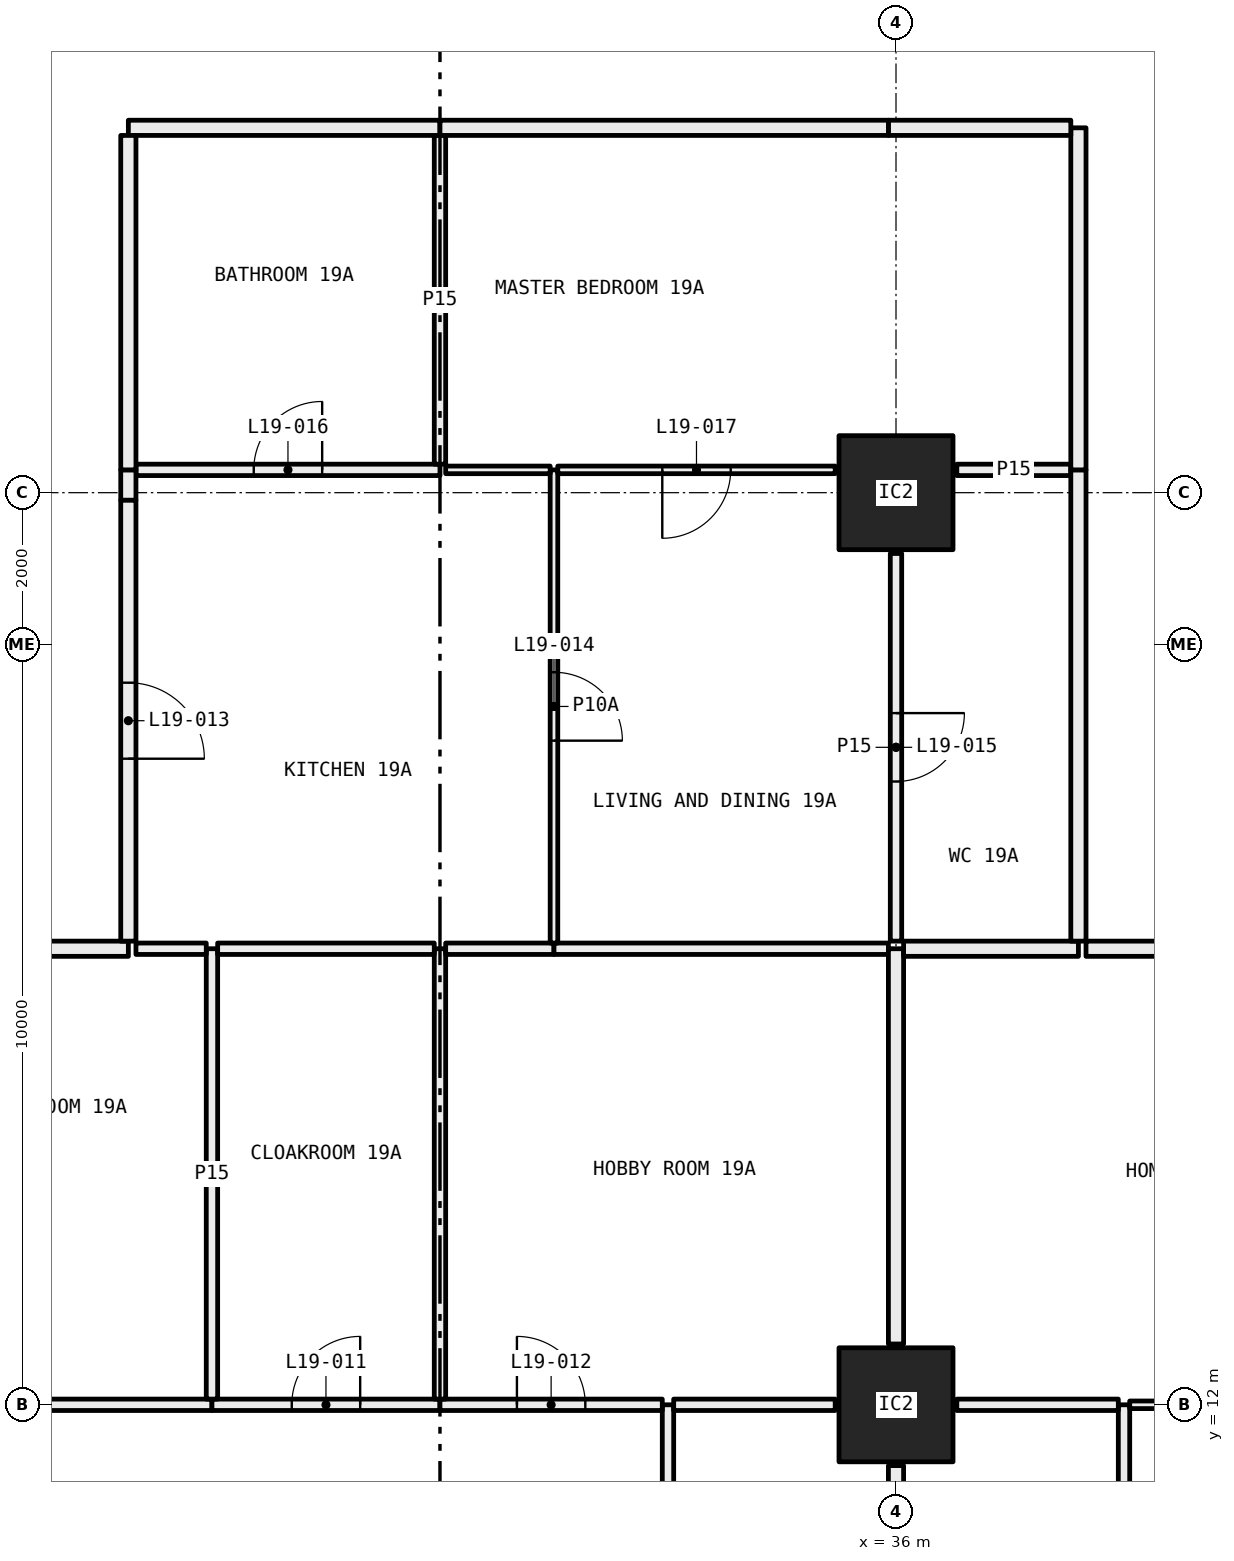
"""IFC4 building model, lengths in metres.
Left out: names, types, materials, properties, quantities, classifications, styles, units other than length and angle.
Written with IfcOpenShell. Run it as: python <this file> out.ifc"""

import sys

from ifc_helpers import new_model, si_unit, direction, frame, frame_2d, origin, origin_2d, place, context, subcontext, project, spatial, rectangle, hollow_rectangle, extrude, element, fill, save


model = new_model("IFC4")
c1 = context("Model", 3, precision=1e-05, world=origin(), true_north=direction((0.0, 1.0)))
c2 = subcontext(c1, "Body", "Model", "MODEL_VIEW")
j1 = project(units=[si_unit("LENGTHUNIT", "METRE"), si_unit("PLANEANGLEUNIT", "RADIAN")], contexts=[c1])
p1 = place(None, origin())
s1 = spatial("IfcSite", under=j1, at=p1, CompositionType="ELEMENT")
p2 = place(p1, origin())
s2 = spatial("IfcBuilding", under=s1, at=p2, CompositionType="ELEMENT")
p3 = place(p2, frame((0.0, 0.0, 78.3)))
s3 = spatial("IfcBuildingStorey", under=s2, at=p3, CompositionType="ELEMENT", Elevation=78.3)
for number, where, z_axis, x_axis in (
    (1, (36.0, 12.0, 0.0), (0.0, 0.0, 1.0), (1.0, 0.0, 0.0)),
    (2, (36.0, 24.0, 0.0), (0.0, 0.0, 1.0), (1.0, 0.0, 0.0)),
):
    element("IfcColumn", number, at=place(p3, frame(where, z_axis=z_axis, x_axis=x_axis)), inside=s3, PredefinedType="COLUMN", context=c2, shape_type="SweptSolid", body=[
        extrude(hollow_rectangle(XDim=1.5, YDim=1.5, WallThickness=0.065, at=origin_2d()), origin(), (0.0, 0.0, 1.0), 3.05),
    ])
p4 = place(p3, frame((33.0, 6.075, 0.0), z_axis=(0.0, 0.0, 1.0), x_axis=(0.0, 1.0, 0.0)))
e3 = element("IfcWall", 3, at=p4, inside=s3, PredefinedType="PARTITIONING", context=c2, shape_type="SweptSolid", body=[
    extrude(rectangle(XDim=5.925, YDim=0.15, at=frame_2d((2.962, 0.0))), origin(), (0.0, 0.0, 1.0), 2.45),
])
p5 = place(p4, frame((2.512, 0.0, 0.0)))
e4 = element("IfcOpeningElement", 4, at=p5, cuts=e3, PredefinedType="OPENING", context=c2, shape_type="SweptSolid", body=[
    extrude(rectangle(XDim=0.9, YDim=2.1, at=frame_2d((0.45, 1.05))), frame((0.0, 0.085, 0.0), z_axis=(0.0, -1.0, 0.0), x_axis=(1.0, 0.0, 0.0)), (0.0, 0.0, 1.0), 0.17),
])
p6 = place(p3, frame((27.0, 12.0, 0.0), z_axis=(0.0, 0.0, 1.0), x_axis=(-1.0, 0.0, 0.0)))
e5 = element("IfcWall", 5, at=p6, inside=s3, PredefinedType="PARTITIONING", context=c2, shape_type="SweptSolid", body=[
    extrude(rectangle(XDim=2.2, YDim=0.15, at=frame_2d((1.1, 0.0))), origin(), (0.0, 0.0, 1.0), 2.45),
])
p7 = place(p3, frame((30.0, 12.0, 0.0), z_axis=(0.0, 0.0, 1.0), x_axis=(-1.0, 0.0, 0.0)))
e6 = element("IfcWall", 6, at=p7, inside=s3, PredefinedType="PARTITIONING", context=c2, shape_type="SweptSolid", body=[
    extrude(rectangle(XDim=3.0, YDim=0.15, at=frame_2d((1.5, 0.0))), origin(), (0.0, 0.0, 1.0), 2.45),
])
p8 = place(p7, frame((1.05, 0.0, 0.0)))
e7 = element("IfcOpeningElement", 7, at=p8, cuts=e6, PredefinedType="OPENING", context=c2, shape_type="SweptSolid", body=[
    extrude(rectangle(XDim=0.9, YDim=2.1, at=frame_2d((0.45, 1.05))), frame((0.0, 0.085, 0.0), z_axis=(0.0, -1.0, 0.0), x_axis=(1.0, 0.0, 0.0)), (0.0, 0.0, 1.0), 0.17),
])
p9 = place(p3, frame((32.925, 12.0, 0.0), z_axis=(0.0, 0.0, 1.0), x_axis=(-1.0, 0.0, 0.0)))
e8 = element("IfcWall", 8, at=p9, inside=s3, PredefinedType="PARTITIONING", context=c2, shape_type="SweptSolid", body=[
    extrude(rectangle(XDim=2.925, YDim=0.15, at=frame_2d((1.462, 0.0))), origin(), (0.0, 0.0, 1.0), 2.45),
])
p10 = place(p9, frame((1.012, 0.0, 0.0)))
e9 = element("IfcOpeningElement", 9, at=p10, cuts=e8, PredefinedType="OPENING", context=c2, shape_type="SweptSolid", body=[
    extrude(rectangle(XDim=0.9, YDim=2.1, at=frame_2d((0.45, 1.05))), frame((0.0, 0.085, 0.0), z_axis=(0.0, -1.0, 0.0), x_axis=(1.0, 0.0, 0.0)), (0.0, 0.0, 1.0), 0.17),
])
p11 = place(p3, frame((35.2, 12.0, 0.0), z_axis=(0.0, 0.0, 1.0), x_axis=(-1.0, 0.0, 0.0)))
e10 = element("IfcWall", 10, at=p11, inside=s3, PredefinedType="PARTITIONING", context=c2, shape_type="SweptSolid", body=[
    extrude(rectangle(XDim=2.125, YDim=0.15, at=frame_2d((1.062, 0.0))), origin(), (0.0, 0.0, 1.0), 2.45),
])
p12 = place(p3, frame((36.0, 6.0, 0.0), z_axis=(0.0, 0.0, 1.0), x_axis=(0.0, 1.0, 0.0)))
e11 = element("IfcWall", 11, at=p12, inside=s3, PredefinedType="PARTITIONING", context=c2, shape_type="SweptSolid", body=[
    extrude(rectangle(XDim=5.2, YDim=0.2, at=frame_2d((2.6, 0.0))), origin(), (0.0, 0.0, 1.0), 2.45),
])
p13 = place(p3, frame((27.0, 12.075, 0.0), z_axis=(0.0, 0.0, 1.0), x_axis=(0.0, 1.0, 0.0)))
e12 = element("IfcWall", 12, at=p13, inside=s3, PredefinedType="PARTITIONING", context=c2, shape_type="SweptSolid", body=[
    extrude(rectangle(XDim=5.925, YDim=0.15, at=frame_2d((2.962, 0.0))), origin(), (0.0, 0.0, 1.0), 2.45),
])
p14 = place(p3, frame((26.925, 18.0, 0.0), z_axis=(0.0, 0.0, 1.0), x_axis=(-1.0, 0.0, 0.0)))
e13 = element("IfcWall", 13, at=p14, inside=s3, PredefinedType="PARTITIONING", context=c2, shape_type="SweptSolid", body=[
    extrude(rectangle(XDim=0.925, YDim=0.15, at=frame_2d((0.462, 0.0))), origin(), (0.0, 0.0, 1.0), 3.05),
])
p15 = place(p3, frame((25.9, 18.0, 0.0), z_axis=(0.0, 0.0, 1.0), x_axis=(-1.0, 0.0, 0.0)))
e14 = element("IfcWall", 14, at=p15, inside=s3, PredefinedType="PARTITIONING", context=c2, shape_type="SweptSolid", body=[
    extrude(rectangle(XDim=3.4, YDim=0.2, at=frame_2d((1.7, 0.0))), origin(), (0.0, 0.0, 1.0), 3.05),
])
p16 = place(p3, frame((30.0, 12.075, 0.0), z_axis=(0.0, 0.0, 1.0), x_axis=(0.0, 1.0, 0.0)))
e15 = element("IfcWall", 15, at=p16, inside=s3, PredefinedType="PARTITIONING", context=c2, shape_type="SweptSolid", body=[
    extrude(rectangle(XDim=5.925, YDim=0.15, at=frame_2d((2.962, 0.0))), origin(), (0.0, 0.0, 1.0), 2.45),
])
p17 = place(p3, frame((29.925, 18.0, 0.0), z_axis=(0.0, 0.0, 1.0), x_axis=(-1.0, 0.0, 0.0)))
e16 = element("IfcWall", 16, at=p17, inside=s3, PredefinedType="PARTITIONING", context=c2, shape_type="SweptSolid", body=[
    extrude(rectangle(XDim=2.85, YDim=0.15, at=frame_2d((1.425, 0.0))), origin(), (0.0, 0.0, 1.0), 3.05),
])
p18 = place(p3, frame((31.5, 18.0, 0.0), z_axis=(0.0, 0.0, 1.0), x_axis=(-1.0, 0.0, 0.0)))
e17 = element("IfcWall", 17, at=p18, inside=s3, PredefinedType="PARTITIONING", context=c2, shape_type="SweptSolid", body=[
    extrude(rectangle(XDim=1.425, YDim=0.15, at=frame_2d((0.712, 0.0))), origin(), (0.0, 0.0, 1.0), 3.05),
])
p19 = place(p3, frame((35.9, 18.0, 0.0), z_axis=(0.0, 0.0, 1.0), x_axis=(-1.0, 0.0, 0.0)))
e18 = element("IfcWall", 18, at=p19, inside=s3, PredefinedType="PARTITIONING", context=c2, shape_type="SweptSolid", body=[
    extrude(rectangle(XDim=4.4, YDim=0.15, at=frame_2d((2.2, 0.0))), origin(), (0.0, 0.0, 1.0), 3.05),
])
p20 = place(p3, frame((36.0, 12.8, 0.0), z_axis=(0.0, 0.0, 1.0), x_axis=(0.0, 1.0, 0.0)))
e19 = element("IfcWall", 19, at=p20, inside=s3, PredefinedType="PARTITIONING", context=c2, shape_type="SweptSolid", body=[
    extrude(rectangle(XDim=5.2, YDim=0.2, at=frame_2d((2.6, 0.0))), origin(), (0.0, 0.0, 1.0), 2.45),
])
p21 = place(p3, frame((31.5, 18.075, 0.0), z_axis=(0.0, 0.0, 1.0), x_axis=(0.0, 1.0, 0.0)))
e20 = element("IfcWall", 20, at=p21, inside=s3, PredefinedType="PARTITIONING", context=c2, shape_type="SweptSolid", body=[
    extrude(rectangle(XDim=6.225, YDim=0.1, at=frame_2d((3.113, 0.0))), origin(), (0.0, 0.0, 1.0), 2.45),
])
p22 = place(p21, frame((2.663, 0.0, 0.0)))
e21 = element("IfcOpeningElement", 21, at=p22, cuts=e20, PredefinedType="OPENING", context=c2, shape_type="SweptSolid", body=[
    extrude(rectangle(XDim=0.9, YDim=2.1, at=frame_2d((0.45, 1.05))), frame((0.0, 0.06, 0.0), z_axis=(0.0, -1.0, 0.0), x_axis=(1.0, 0.0, 0.0)), (0.0, 0.0, 1.0), 0.12),
])
p23 = place(p3, frame((30.0, 24.3, 0.0), z_axis=(0.0, 0.0, 1.0), x_axis=(-1.0, 0.0, 0.0)))
e22 = element("IfcWall", 22, at=p23, inside=s3, PredefinedType="PARTITIONING", context=c2, shape_type="SweptSolid", body=[
    extrude(rectangle(XDim=4.0, YDim=0.15, at=frame_2d((2.0, 0.0))), origin(), (0.0, 0.0, 1.0), 3.05),
])
p24 = place(p23, frame((1.55, 0.0, 0.0)))
e23 = element("IfcOpeningElement", 23, at=p24, cuts=e22, PredefinedType="OPENING", context=c2, shape_type="SweptSolid", body=[
    extrude(rectangle(XDim=0.9, YDim=2.1, at=frame_2d((0.45, 1.05))), frame((0.0, 0.085, 0.0), z_axis=(0.0, -1.0, 0.0), x_axis=(1.0, 0.0, 0.0)), (0.0, 0.0, 1.0), 0.17),
])
p25 = place(p3, frame((31.45, 24.3, 0.0), z_axis=(0.0, 0.0, 1.0), x_axis=(-1.0, 0.0, 0.0)))
e24 = element("IfcWall", 24, at=p25, inside=s3, PredefinedType="PARTITIONING", context=c2, shape_type="SweptSolid", body=[
    extrude(rectangle(XDim=1.375, YDim=0.1, at=frame_2d((0.688, 0.0))), origin(), (0.0, 0.0, 1.0), 3.05),
])
p26 = place(p3, frame((25.9, 24.3, 0.0), z_axis=(0.0, 0.0, 1.0), x_axis=(0.0, -1.0, 0.0)))
e25 = element("IfcWall", 25, at=p26, inside=s3, PredefinedType="PARTITIONING", context=c2, shape_type="SweptSolid", body=[
    extrude(rectangle(XDim=0.4, YDim=0.2, at=frame_2d((0.2, 0.0))), origin(), (0.0, 0.0, 1.0), 2.45),
])
p27 = place(p3, frame((25.9, 23.9, 0.0), z_axis=(0.0, 0.0, 1.0), x_axis=(0.0, -1.0, 0.0)))
e26 = element("IfcWall", 26, at=p27, inside=s3, PredefinedType="PARTITIONING", context=c2, shape_type="SweptSolid", body=[
    extrude(rectangle(XDim=5.8, YDim=0.2, at=frame_2d((2.9, 0.0))), origin(), (0.0, 0.0, 1.0), 3.05),
])
p28 = place(p27, frame((2.4, 0.0, 0.0)))
e27 = element("IfcOpeningElement", 27, at=p28, cuts=e26, PredefinedType="OPENING", context=c2, shape_type="SweptSolid", body=[
    extrude(rectangle(XDim=1.0, YDim=2.1, at=frame_2d((0.5, 1.05))), frame((0.0, 0.11, 0.0), z_axis=(0.0, -1.0, 0.0), x_axis=(1.0, 0.0, 0.0)), (0.0, 0.0, 1.0), 0.22),
])
p29 = place(p3, frame((36.0, 18.1, 0.0), z_axis=(0.0, 0.0, 1.0), x_axis=(0.0, 1.0, 0.0)))
e28 = element("IfcWall", 28, at=p29, inside=s3, PredefinedType="PARTITIONING", context=c2, shape_type="SweptSolid", body=[
    extrude(rectangle(XDim=5.1, YDim=0.15, at=frame_2d((2.55, 0.0))), origin(), (0.0, 0.0, 1.0), 2.45),
])
p30 = place(p29, frame((2.1, 0.0, 0.0)))
e29 = element("IfcOpeningElement", 29, at=p30, cuts=e28, PredefinedType="OPENING", context=c2, shape_type="SweptSolid", body=[
    extrude(rectangle(XDim=0.9, YDim=2.1, at=frame_2d((0.45, 1.05))), frame((0.0, 0.085, 0.0), z_axis=(0.0, -1.0, 0.0), x_axis=(1.0, 0.0, 0.0)), (0.0, 0.0, 1.0), 0.17),
])
p31 = place(p3, frame((35.2, 24.3, 0.0), z_axis=(0.0, 0.0, 1.0), x_axis=(-1.0, 0.0, 0.0)))
e30 = element("IfcWall", 30, at=p31, inside=s3, PredefinedType="PARTITIONING", context=c2, shape_type="SweptSolid", body=[
    extrude(rectangle(XDim=3.65, YDim=0.1, at=frame_2d((1.825, 0.0))), origin(), (0.0, 0.0, 1.0), 3.05),
])
p32 = place(p31, frame((1.375, 0.0, 0.0)))
e31 = element("IfcOpeningElement", 31, at=p32, cuts=e30, PredefinedType="OPENING", context=c2, shape_type="SweptSolid", body=[
    extrude(rectangle(XDim=0.9, YDim=2.1, at=frame_2d((0.45, 1.05))), frame((0.0, 0.06, 0.0), z_axis=(0.0, -1.0, 0.0), x_axis=(1.0, 0.0, 0.0)), (0.0, 0.0, 1.0), 0.12),
])
p33 = place(p3, frame((38.3, 24.3, 0.0), z_axis=(0.0, 0.0, 1.0), x_axis=(-1.0, 0.0, 0.0)))
e32 = element("IfcWall", 32, at=p33, inside=s3, PredefinedType="PARTITIONING", context=c2, shape_type="SweptSolid", body=[
    extrude(rectangle(XDim=1.5, YDim=0.15, at=frame_2d((0.75, 0.0))), origin(), (0.0, 0.0, 1.0), 3.05),
])
p34 = place(p3, frame((36.1, 18.0, 0.0), z_axis=(0.0, 0.0, 1.0), x_axis=(1.0, 0.0, 0.0)))
e33 = element("IfcWall", 33, at=p34, inside=s3, PredefinedType="PARTITIONING", context=c2, shape_type="SweptSolid", body=[
    extrude(rectangle(XDim=2.3, YDim=0.2, at=frame_2d((1.15, 0.0))), origin(), (0.0, 0.0, 1.0), 3.05),
])
p35 = place(p3, frame((38.4, 18.1, 0.0), z_axis=(0.0, 0.0, 1.0), x_axis=(0.0, 1.0, 0.0)))
e34 = element("IfcWall", 34, at=p35, inside=s3, PredefinedType="PARTITIONING", context=c2, shape_type="SweptSolid", body=[
    extrude(rectangle(XDim=6.2, YDim=0.2, at=frame_2d((3.1, 0.0))), origin(), (0.0, 0.0, 1.0), 2.45),
])
p36 = place(p3, frame((30.0, 24.375, 0.0), z_axis=(0.0, 0.0, 1.0), x_axis=(0.0, 1.0, 0.0)))
e35 = element("IfcWall", 35, at=p36, inside=s3, PredefinedType="PARTITIONING", context=c2, shape_type="SweptSolid", body=[
    extrude(rectangle(XDim=4.325, YDim=0.15, at=frame_2d((2.163, 0.0))), origin(), (0.0, 0.0, 1.0), 3.05),
])
p37 = place(p3, frame((30.0, 28.8, 0.0), z_axis=(0.0, 0.0, 1.0), x_axis=(-1.0, 0.0, 0.0)))
e36 = element("IfcWall", 36, at=p37, inside=s3, PredefinedType="PARTITIONING", context=c2, shape_type="SweptSolid", body=[
    extrude(rectangle(XDim=4.1, YDim=0.2, at=frame_2d((2.05, 0.0))), origin(), (0.0, 0.0, 1.0), 3.05),
])
p38 = place(p3, frame((25.9, 28.7, 0.0), z_axis=(0.0, 0.0, 1.0), x_axis=(0.0, -1.0, 0.0)))
e37 = element("IfcWall", 37, at=p38, inside=s3, PredefinedType="PARTITIONING", context=c2, shape_type="SweptSolid", body=[
    extrude(rectangle(XDim=4.4, YDim=0.2, at=frame_2d((2.2, 0.0))), origin(), (0.0, 0.0, 1.0), 3.05),
])
p39 = place(p3, frame((38.4, 24.3, 0.0), z_axis=(0.0, 0.0, 1.0), x_axis=(0.0, 1.0, 0.0)))
e38 = element("IfcWall", 38, at=p39, inside=s3, PredefinedType="PARTITIONING", context=c2, shape_type="SweptSolid", body=[
    extrude(rectangle(XDim=4.5, YDim=0.2, at=frame_2d((2.25, 0.0))), origin(), (0.0, 0.0, 1.0), 3.05),
])
p40 = place(p3, frame((38.3, 28.8, 0.0), z_axis=(0.0, 0.0, 1.0), x_axis=(-1.0, 0.0, 0.0)))
e39 = element("IfcWall", 39, at=p40, inside=s3, PredefinedType="PARTITIONING", context=c2, shape_type="SweptSolid", body=[
    extrude(rectangle(XDim=2.4, YDim=0.2, at=frame_2d((1.2, 0.0))), origin(), (0.0, 0.0, 1.0), 2.45),
])
p41 = place(p3, frame((35.9, 28.8, 0.0), z_axis=(0.0, 0.0, 1.0), x_axis=(-1.0, 0.0, 0.0)))
e40 = element("IfcWall", 40, at=p41, inside=s3, PredefinedType="PARTITIONING", context=c2, shape_type="SweptSolid", body=[
    extrude(rectangle(XDim=5.9, YDim=0.2, at=frame_2d((2.95, 0.0))), origin(), (0.0, 0.0, 1.0), 3.05),
])
p42 = place(p3, frame((39.0, 6.075, 0.0), z_axis=(0.0, 0.0, 1.0), x_axis=(0.0, 1.0, 0.0)))
e41 = element("IfcWall", 41, at=p42, inside=s3, PredefinedType="PARTITIONING", context=c2, shape_type="SweptSolid", body=[
    extrude(rectangle(XDim=5.925, YDim=0.15, at=frame_2d((2.962, 0.0))), origin(), (0.0, 0.0, 1.0), 2.45),
])
p43 = place(p42, frame((2.512, 0.0, 0.0)))
e42 = element("IfcOpeningElement", 42, at=p43, cuts=e41, PredefinedType="OPENING", context=c2, shape_type="SweptSolid", body=[
    extrude(rectangle(XDim=0.9, YDim=2.1, at=frame_2d((0.45, 1.05))), frame((0.0, 0.085, 0.0), z_axis=(0.0, -1.0, 0.0), x_axis=(1.0, 0.0, 0.0)), (0.0, 0.0, 1.0), 0.17),
])
p44 = place(p3, frame((38.925, 12.0, 0.0), z_axis=(0.0, 0.0, 1.0), x_axis=(-1.0, 0.0, 0.0)))
e43 = element("IfcWall", 43, at=p44, inside=s3, PredefinedType="PARTITIONING", context=c2, shape_type="SweptSolid", body=[
    extrude(rectangle(XDim=2.125, YDim=0.15, at=frame_2d((1.062, 0.0))), origin(), (0.0, 0.0, 1.0), 2.45),
])
p45 = place(p3, frame((45.0, 12.0, 0.0), z_axis=(0.0, 0.0, 1.0), x_axis=(-1.0, 0.0, 0.0)))
e44 = element("IfcWall", 44, at=p45, inside=s3, PredefinedType="PARTITIONING", context=c2, shape_type="SweptSolid", body=[
    extrude(rectangle(XDim=5.925, YDim=0.1, at=frame_2d((2.962, 0.0))), origin(), (0.0, 0.0, 1.0), 2.45),
])
p46 = place(p45, frame((2.512, 0.0, 0.0)))
e45 = element("IfcOpeningElement", 45, at=p46, cuts=e44, PredefinedType="OPENING", context=c2, shape_type="SweptSolid", body=[
    extrude(rectangle(XDim=0.9, YDim=2.1, at=frame_2d((0.45, 1.05))), frame((0.0, 0.06, 0.0), z_axis=(0.0, -1.0, 0.0), x_axis=(1.0, 0.0, 0.0)), (0.0, 0.0, 1.0), 0.12),
])
p47 = place(p3, frame((40.8, 18.0, 0.0), z_axis=(0.0, 0.0, 1.0), x_axis=(-1.0, 0.0, 0.0)))
e46 = element("IfcWall", 46, at=p47, inside=s3, PredefinedType="PARTITIONING", context=c2, shape_type="SweptSolid", body=[
    extrude(rectangle(XDim=2.3, YDim=0.2, at=frame_2d((1.15, 0.0))), origin(), (0.0, 0.0, 1.0), 3.05),
])
p48 = place(p8, frame((0.9, 0.0, 0.0), x_axis=(-1.0, 0.0, 0.0)))
e47 = element("IfcDoor", 47, at=p48, inside=s3, OperationType="SINGLE_SWING_LEFT", PredefinedType="DOOR", context=c2, shape_type="SweptSolid", body=[
    extrude(rectangle(XDim=0.9, YDim=2.1, at=frame_2d((0.45, 1.05))), frame((0.0, 0.025, 0.0), z_axis=(0.0, -1.0, 0.0), x_axis=(1.0, 0.0, 0.0)), (0.0, 0.0, 1.0), 0.05),
])
fill(e7, e47)
p49 = place(p10, frame((0.9, 0.0, 0.0), x_axis=(-1.0, 0.0, 0.0)))
e48 = element("IfcDoor", 48, at=p49, inside=s3, OperationType="SINGLE_SWING_RIGHT", PredefinedType="DOOR", context=c2, shape_type="SweptSolid", body=[
    extrude(rectangle(XDim=0.9, YDim=2.1, at=frame_2d((0.45, 1.05))), frame((0.0, 0.025, 0.0), z_axis=(0.0, -1.0, 0.0), x_axis=(1.0, 0.0, 0.0)), (0.0, 0.0, 1.0), 0.05),
])
fill(e9, e48)
p50 = place(p28, origin())
e49 = element("IfcDoor", 49, at=p50, inside=s3, OperationType="SINGLE_SWING_LEFT", PredefinedType="DOOR", context=c2, shape_type="SweptSolid", body=[
    extrude(rectangle(XDim=1.0, YDim=2.1, at=frame_2d((0.5, 1.05))), frame((0.0, 0.025, 0.0), z_axis=(0.0, -1.0, 0.0), x_axis=(1.0, 0.0, 0.0)), (0.0, 0.0, 1.0), 0.05),
])
fill(e27, e49)
p51 = place(p22, frame((0.9, 0.0, 0.0), x_axis=(-1.0, 0.0, 0.0)))
e50 = element("IfcDoor", 50, at=p51, inside=s3, OperationType="SINGLE_SWING_LEFT", PredefinedType="DOOR", context=c2, shape_type="SweptSolid", body=[
    extrude(rectangle(XDim=0.9, YDim=2.1, at=frame_2d((0.45, 1.05))), frame((0.0, 0.025, 0.0), z_axis=(0.0, -1.0, 0.0), x_axis=(1.0, 0.0, 0.0)), (0.0, 0.0, 1.0), 0.05),
])
fill(e21, e50)
p52 = place(p30, frame((0.9, 0.0, 0.0), x_axis=(-1.0, 0.0, 0.0)))
e51 = element("IfcDoor", 51, at=p52, inside=s3, OperationType="SINGLE_SWING_RIGHT", PredefinedType="DOOR", context=c2, shape_type="SweptSolid", body=[
    extrude(rectangle(XDim=0.9, YDim=2.1, at=frame_2d((0.45, 1.05))), frame((0.0, 0.025, 0.0), z_axis=(0.0, -1.0, 0.0), x_axis=(1.0, 0.0, 0.0)), (0.0, 0.0, 1.0), 0.05),
])
fill(e29, e51)
p53 = place(p24, frame((0.9, 0.0, 0.0), x_axis=(-1.0, 0.0, 0.0)))
e52 = element("IfcDoor", 52, at=p53, inside=s3, OperationType="SINGLE_SWING_LEFT", PredefinedType="DOOR", context=c2, shape_type="SweptSolid", body=[
    extrude(rectangle(XDim=0.9, YDim=2.1, at=frame_2d((0.45, 1.05))), frame((0.0, 0.025, 0.0), z_axis=(0.0, -1.0, 0.0), x_axis=(1.0, 0.0, 0.0)), (0.0, 0.0, 1.0), 0.05),
])
fill(e23, e52)
p54 = place(p32, origin())
e53 = element("IfcDoor", 53, at=p54, inside=s3, OperationType="SINGLE_SWING_LEFT", PredefinedType="DOOR", context=c2, shape_type="SweptSolid", body=[
    extrude(rectangle(XDim=0.9, YDim=2.1, at=frame_2d((0.45, 1.05))), frame((0.0, 0.025, 0.0), z_axis=(0.0, -1.0, 0.0), x_axis=(1.0, 0.0, 0.0)), (0.0, 0.0, 1.0), 0.05),
])
fill(e31, e53)
save(model, sys.argv[1])
